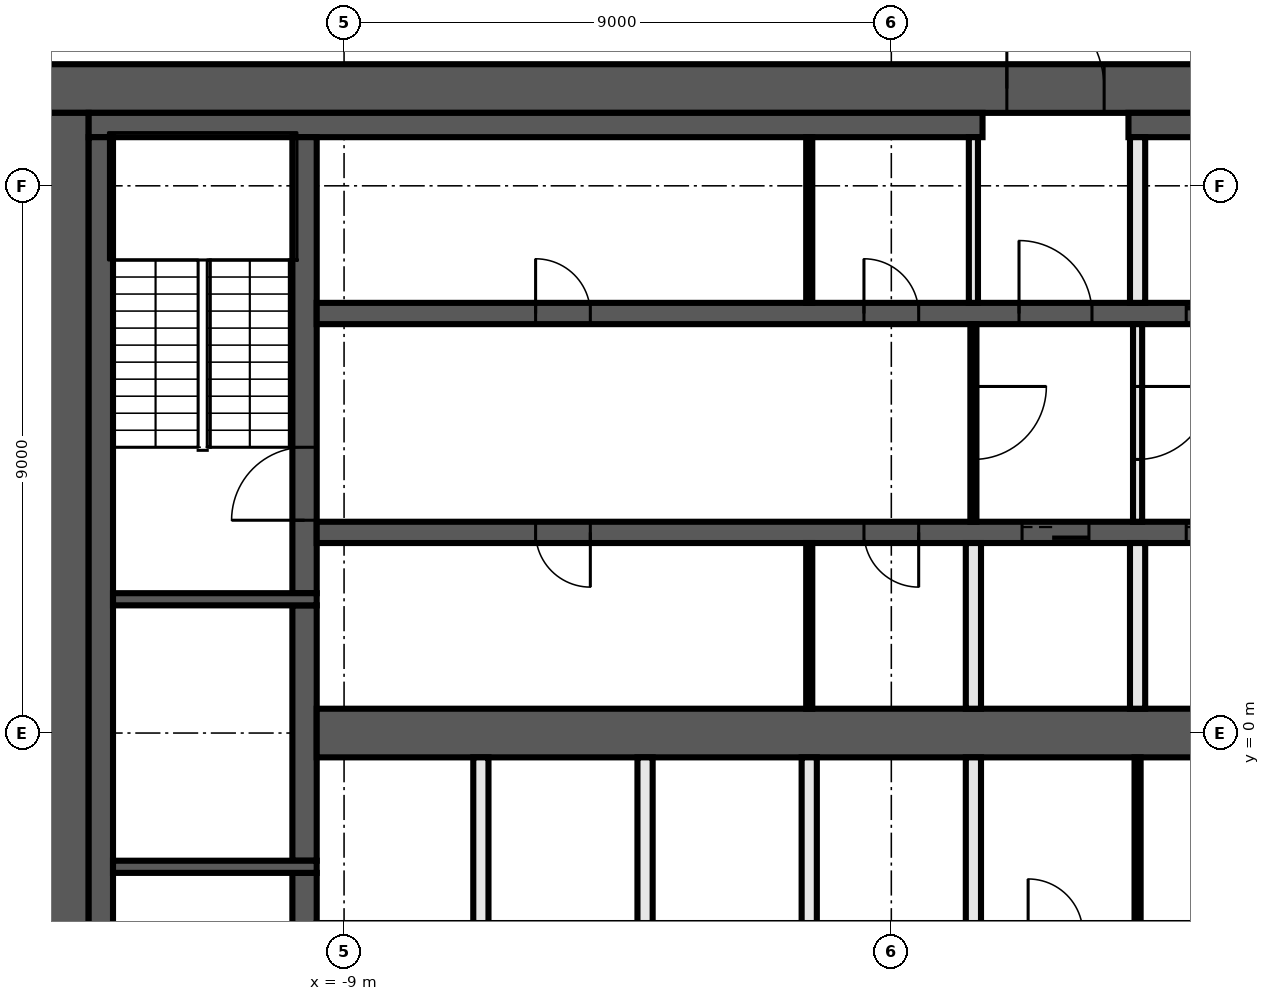
"""IFC4 building model, lengths in metres.
Left out: names, types, materials, properties, quantities, classifications, styles, units other than length and angle.
Written with IfcOpenShell. Run it as: python <this file> out.ifc"""

import sys

from ifc_helpers import new_model, si_unit, direction, frame, frame_2d, origin, place, context, subcontext, project, spatial, rectangle, extrude, element, fill, save


model = new_model("IFC4")
c1 = context("Model", 3, precision=1e-05, world=origin(), true_north=direction((0.0, 1.0)))
c2 = subcontext(c1, "Body", "Model", "MODEL_VIEW")
j1 = project(units=[si_unit("LENGTHUNIT", "METRE"), si_unit("PLANEANGLEUNIT", "RADIAN")], contexts=[c1])
p1 = place(None, origin())
s1 = spatial("IfcSite", under=j1, at=p1, CompositionType="ELEMENT")
p2 = place(p1, origin())
s2 = spatial("IfcBuilding", under=s1, at=p2, CompositionType="ELEMENT")
p3 = place(p2, frame((0.0, 0.0, 175.4)))
s3 = spatial("IfcBuildingStorey", under=s2, at=p3, CompositionType="ELEMENT", Elevation=175.4)
p4 = place(p3, frame((-14.0, 10.6, 0.0), z_axis=(0.0, 0.0, 1.0), x_axis=(1.0, 0.0, 0.0)))
e1 = element("IfcWall", 1, at=p4, inside=s3, PredefinedType="SHEAR", context=c2, shape_type="SweptSolid", body=[
    extrude(rectangle(XDim=28.0, YDim=0.8, at=frame_2d((14.0, 0.0))), origin(), (0.0, 0.0, 1.0), 3.82),
])
p5 = place(p4, frame((15.9, 0.0, 0.0)))
e2 = element("IfcOpeningElement", 2, at=p5, cuts=e1, PredefinedType="OPENING", context=c2, shape_type="SweptSolid", body=[
    extrude(rectangle(XDim=1.6, YDim=2.1, at=frame_2d((0.8, 1.05))), frame((0.0, 0.41, 0.0), z_axis=(0.0, -1.0, 0.0), x_axis=(1.0, 0.0, 0.0)), (0.0, 0.0, 1.0), 0.82),
])
p6 = place(p3, frame((-13.6, -10.2, 0.0), z_axis=(0.0, 0.0, 1.0), x_axis=(0.0, 1.0, 0.0)))
e3 = element("IfcWall", 3, at=p6, inside=s3, PredefinedType="SHEAR", context=c2, shape_type="SweptSolid", body=[
    extrude(rectangle(XDim=20.4, YDim=0.8, at=frame_2d((10.2, 0.0))), origin(), (0.0, 0.0, 1.0), 3.82),
])
p7 = place(p3, frame((-13.2, 10.0, 0.0), z_axis=(0.0, 0.0, 1.0), x_axis=(1.0, 0.0, 0.0)))
e4 = element("IfcWall", 4, at=p7, inside=s3, PredefinedType="SHEAR", context=c2, shape_type="SweptSolid", body=[
    extrude(rectangle(XDim=14.7, YDim=0.4, at=frame_2d((7.35, 0.0))), origin(), (0.0, 0.0, 1.0), 3.82),
])
p8 = place(p3, frame((3.9, 10.0, 0.0), z_axis=(0.0, 0.0, 1.0), x_axis=(1.0, 0.0, 0.0)))
e5 = element("IfcWall", 5, at=p8, inside=s3, PredefinedType="SHEAR", context=c2, shape_type="SweptSolid", body=[
    extrude(rectangle(XDim=9.3, YDim=0.4, at=frame_2d((4.65, 0.0))), origin(), (0.0, 0.0, 1.0), 3.82),
])
p9 = place(p3, frame((-13.0, -9.8, 0.0), z_axis=(0.0, 0.0, 1.0), x_axis=(0.0, 1.0, 0.0)))
e6 = element("IfcWall", 6, at=p9, inside=s3, PredefinedType="SHEAR", context=c2, shape_type="SweptSolid", body=[
    extrude(rectangle(XDim=19.6, YDim=0.4, at=frame_2d((9.8, 0.0))), origin(), (0.0, 0.0, 1.0), 3.82),
])
p10 = place(p3, frame((-9.65, -9.8, 0.0), z_axis=(0.0, 0.0, 1.0), x_axis=(0.0, 1.0, 0.0)))
e7 = element("IfcWall", 7, at=p10, inside=s3, PredefinedType="SHEAR", context=c2, shape_type="SweptSolid", body=[
    extrude(rectangle(XDim=7.5, YDim=0.4, at=frame_2d((3.75, 0.0))), origin(), (0.0, 0.0, 1.0), 3.82),
])
p11 = place(p10, frame((5.1, 0.0, 0.0)))
e8 = element("IfcOpeningElement", 8, at=p11, cuts=e7, PredefinedType="OPENING", context=c2, shape_type="SweptSolid", body=[
    extrude(rectangle(XDim=1.2, YDim=2.1, at=frame_2d((0.6, 1.05))), frame((0.0, 0.21, 0.0), z_axis=(0.0, -1.0, 0.0), x_axis=(1.0, 0.0, 0.0)), (0.0, 0.0, 1.0), 0.42),
])
p12 = place(p3, frame((-9.65, -2.1, 0.0), z_axis=(0.0, 0.0, 1.0), x_axis=(0.0, 1.0, 0.0)))
e9 = element("IfcWall", 9, at=p12, inside=s3, PredefinedType="SHEAR", context=c2, shape_type="SweptSolid", body=[
    extrude(rectangle(XDim=4.2, YDim=0.4, at=frame_2d((2.1, 0.0))), origin(), (0.0, 0.0, 1.0), 3.82),
])
p13 = place(p3, frame((-9.65, 2.3, 0.0), z_axis=(0.0, 0.0, 1.0), x_axis=(0.0, 1.0, 0.0)))
e10 = element("IfcWall", 10, at=p13, inside=s3, PredefinedType="SHEAR", context=c2, shape_type="SweptSolid", body=[
    extrude(rectangle(XDim=7.5, YDim=0.4, at=frame_2d((3.75, 0.0))), origin(), (0.0, 0.0, 1.0), 3.82),
])
p14 = place(p13, frame((1.2, 0.0, 0.0)))
e11 = element("IfcOpeningElement", 11, at=p14, cuts=e10, PredefinedType="OPENING", context=c2, shape_type="SweptSolid", body=[
    extrude(rectangle(XDim=1.2, YDim=2.1, at=frame_2d((0.6, 1.05))), frame((0.0, 0.21, 0.0), z_axis=(0.0, -1.0, 0.0), x_axis=(1.0, 0.0, 0.0)), (0.0, 0.0, 1.0), 0.42),
])
for number, where, z_axis, x_axis in (
    (12, (-9.45, 2.2, 0.0), (0.0, 0.0, 1.0), (-1.0, 0.0, 0.0)),
    (13, (-9.45, -2.2, 0.0), (0.0, 0.0, 1.0), (-1.0, 0.0, 0.0)),
):
    element("IfcWall", number, at=place(p3, frame(where, z_axis=z_axis, x_axis=x_axis)), inside=s3, PredefinedType="SHEAR", context=c2, shape_type="SweptSolid", body=[
        extrude(rectangle(XDim=3.35, YDim=0.2, at=frame_2d((1.675, 0.0))), origin(), (0.0, 0.0, 1.0), 3.82),
    ])
p15 = place(p3, frame((-9.45, 6.9, 0.0), z_axis=(0.0, 0.0, 1.0), x_axis=(1.0, 0.0, 0.0)))
e14 = element("IfcWall", 14, at=p15, inside=s3, PredefinedType="SHEAR", context=c2, shape_type="SweptSolid", body=[
    extrude(rectangle(XDim=18.9, YDim=0.35, at=frame_2d((9.45, 0.0))), origin(), (0.0, 0.0, 1.0), 3.82),
])
p16 = place(p15, frame((11.55, 0.0, 0.0)))
e15 = element("IfcOpeningElement", 15, at=p16, cuts=e14, PredefinedType="OPENING", context=c2, shape_type="SweptSolid", body=[
    extrude(rectangle(XDim=1.2, YDim=2.1, at=frame_2d((0.6, 1.05))), frame((0.0, 0.185, 0.0), z_axis=(0.0, -1.0, 0.0), x_axis=(1.0, 0.0, 0.0)), (0.0, 0.0, 1.0), 0.37),
])
p17 = place(p15, frame((14.3, 0.0, 0.0)))
e16 = element("IfcOpeningElement", 16, at=p17, cuts=e14, PredefinedType="OPENING", context=c2, shape_type="SweptSolid", body=[
    extrude(rectangle(XDim=1.1, YDim=2.1, at=frame_2d((0.55, 1.05))), frame((0.0, 0.185, 0.0), z_axis=(0.0, -1.0, 0.0), x_axis=(1.0, 0.0, 0.0)), (0.0, 0.0, 1.0), 0.37),
])
p18 = place(p15, frame((17.0, 0.0, 0.0)))
e17 = element("IfcOpeningElement", 17, at=p18, cuts=e14, PredefinedType="OPENING", context=c2, shape_type="SweptSolid", body=[
    extrude(rectangle(XDim=1.1, YDim=2.1, at=frame_2d((0.55, 1.05))), frame((0.0, 0.185, 0.0), z_axis=(0.0, -1.0, 0.0), x_axis=(1.0, 0.0, 0.0)), (0.0, 0.0, 1.0), 0.37),
])
p19 = place(p15, frame((3.6, 0.0, 0.0)))
e18 = element("IfcOpeningElement", 18, at=p19, cuts=e14, PredefinedType="OPENING", context=c2, shape_type="SweptSolid", body=[
    extrude(rectangle(XDim=0.9, YDim=2.1, at=frame_2d((0.45, 1.05))), frame((0.0, 0.185, 0.0), z_axis=(0.0, -1.0, 0.0), x_axis=(1.0, 0.0, 0.0)), (0.0, 0.0, 1.0), 0.37),
])
p20 = place(p15, frame((9.0, 0.0, 0.0)))
e19 = element("IfcOpeningElement", 19, at=p20, cuts=e14, PredefinedType="OPENING", context=c2, shape_type="SweptSolid", body=[
    extrude(rectangle(XDim=0.9, YDim=2.1, at=frame_2d((0.45, 1.05))), frame((0.0, 0.185, 0.0), z_axis=(0.0, -1.0, 0.0), x_axis=(1.0, 0.0, 0.0)), (0.0, 0.0, 1.0), 0.37),
])
p21 = place(p3, frame((9.45, 3.3, 0.0), z_axis=(0.0, 0.0, 1.0), x_axis=(-1.0, 0.0, 0.0)))
e20 = element("IfcWall", 20, at=p21, inside=s3, PredefinedType="SHEAR", context=c2, shape_type="SweptSolid", body=[
    extrude(rectangle(XDim=18.9, YDim=0.35, at=frame_2d((9.45, 0.0))), origin(), (0.0, 0.0, 1.0), 3.82),
])
p22 = place(p21, frame((6.2, 0.0, 0.0)))
e21 = element("IfcOpeningElement", 21, at=p22, cuts=e20, PredefinedType="OPENING", context=c2, shape_type="SweptSolid", body=[
    extrude(rectangle(XDim=1.1, YDim=2.1, at=frame_2d((0.55, 1.05))), frame((0.0, 0.185, 0.0), z_axis=(0.0, -1.0, 0.0), x_axis=(1.0, 0.0, 0.0)), (0.0, 0.0, 1.0), 0.37),
])
p23 = place(p21, frame((3.5, 0.0, 0.0)))
e22 = element("IfcOpeningElement", 22, at=p23, cuts=e20, PredefinedType="OPENING", context=c2, shape_type="SweptSolid", body=[
    extrude(rectangle(XDim=1.1, YDim=2.1, at=frame_2d((0.55, 1.05))), frame((0.0, 0.185, 0.0), z_axis=(0.0, -1.0, 0.0), x_axis=(1.0, 0.0, 0.0)), (0.0, 0.0, 1.0), 0.37),
])
p24 = place(p21, frame((0.9, 0.0, 0.0)))
e23 = element("IfcOpeningElement", 23, at=p24, cuts=e20, PredefinedType="OPENING", context=c2, shape_type="SweptSolid", body=[
    extrude(rectangle(XDim=0.9, YDim=2.1, at=frame_2d((0.45, 1.05))), frame((0.0, 0.185, 0.0), z_axis=(0.0, -1.0, 0.0), x_axis=(1.0, 0.0, 0.0)), (0.0, 0.0, 1.0), 0.37),
])
p25 = place(p21, frame((14.4, 0.0, 0.0)))
e24 = element("IfcOpeningElement", 24, at=p25, cuts=e20, PredefinedType="OPENING", context=c2, shape_type="SweptSolid", body=[
    extrude(rectangle(XDim=0.9, YDim=2.1, at=frame_2d((0.45, 1.05))), frame((0.0, 0.185, 0.0), z_axis=(0.0, -1.0, 0.0), x_axis=(1.0, 0.0, 0.0)), (0.0, 0.0, 1.0), 0.37),
])
p26 = place(p21, frame((9.0, 0.0, 0.0)))
e25 = element("IfcOpeningElement", 25, at=p26, cuts=e20, PredefinedType="OPENING", context=c2, shape_type="SweptSolid", body=[
    extrude(rectangle(XDim=0.9, YDim=2.1, at=frame_2d((0.45, 1.05))), frame((0.0, 0.185, 0.0), z_axis=(0.0, -1.0, 0.0), x_axis=(1.0, 0.0, 0.0)), (0.0, 0.0, 1.0), 0.37),
])
p27 = place(p3, frame((-9.45, 0.0, 0.0), z_axis=(0.0, 0.0, 1.0), x_axis=(1.0, 0.0, 0.0)))
e26 = element("IfcWall", 26, at=p27, inside=s3, PredefinedType="SHEAR", context=c2, shape_type="SweptSolid", body=[
    extrude(rectangle(XDim=18.9, YDim=0.8, at=frame_2d((9.45, 0.0))), origin(), (0.0, 0.0, 1.0), 3.82),
])
p28 = place(p3, frame((4.05, 6.725, 0.0), z_axis=(0.0, 0.0, 1.0), x_axis=(0.0, -1.0, 0.0)))
e27 = element("IfcWall", 27, at=p28, inside=s3, PredefinedType="PARTITIONING", context=c2, shape_type="SweptSolid", body=[
    extrude(rectangle(XDim=3.25, YDim=0.15, at=frame_2d((1.625, 0.0))), origin(), (0.0, 0.0, 1.0), 3.82),
])
p29 = place(p28, frame((1.025, 0.0, 0.0)))
e28 = element("IfcOpeningElement", 28, at=p29, cuts=e27, PredefinedType="OPENING", context=c2, shape_type="SweptSolid", body=[
    extrude(rectangle(XDim=1.2, YDim=2.1, at=frame_2d((0.6, 1.05))), frame((0.0, 0.085, 0.0), z_axis=(0.0, -1.0, 0.0), x_axis=(1.0, 0.0, 0.0)), (0.0, 0.0, 1.0), 0.17),
])
p30 = place(p3, frame((4.05, -3.125, 0.0), z_axis=(0.0, 0.0, 1.0), x_axis=(0.0, 1.0, 0.0)))
e29 = element("IfcWall", 29, at=p30, inside=s3, PredefinedType="PARTITIONING", context=c2, shape_type="SweptSolid", body=[
    extrude(rectangle(XDim=2.725, YDim=0.1, at=frame_2d((1.363, 0.0))), origin(), (0.0, 0.0, 1.0), 3.82),
])
for number, where, z_axis, x_axis in (
    (30, (4.05, 0.4, 0.0), (0.0, 0.0, 1.0), (0.0, 1.0, 0.0)),
    (31, (4.05, 7.075, 0.0), (0.0, 0.0, 1.0), (0.0, 1.0, 0.0)),
):
    element("IfcWall", number, at=place(p3, frame(where, z_axis=z_axis, x_axis=x_axis)), inside=s3, PredefinedType="SOLIDWALL", context=c2, shape_type="SweptSolid", body=[
        extrude(rectangle(XDim=2.725, YDim=0.25, at=frame_2d((1.363, 0.0))), origin(), (0.0, 0.0, 1.0), 3.82),
    ])
p31 = place(p3, frame((1.35, 7.075, 0.0), z_axis=(0.0, 0.0, 1.0), x_axis=(0.0, 1.0, 0.0)))
e32 = element("IfcWall", 32, at=p31, inside=s3, PredefinedType="PARTITIONING", context=c2, shape_type="SweptSolid", body=[
    extrude(rectangle(XDim=2.725, YDim=0.15, at=frame_2d((1.363, 0.0))), origin(), (0.0, 0.0, 1.0), 3.82),
])
p32 = place(p3, frame((1.35, 6.725, 0.0), z_axis=(0.0, 0.0, 1.0), x_axis=(0.0, -1.0, 0.0)))
e33 = element("IfcWall", 33, at=p32, inside=s3, PredefinedType="PARTITIONING", context=c2, shape_type="SweptSolid", body=[
    extrude(rectangle(XDim=3.25, YDim=0.1, at=frame_2d((1.625, 0.0))), origin(), (0.0, 0.0, 1.0), 3.82),
])
p33 = place(p32, frame((1.025, 0.0, 0.0)))
e34 = element("IfcOpeningElement", 34, at=p33, cuts=e33, PredefinedType="OPENING", context=c2, shape_type="SweptSolid", body=[
    extrude(rectangle(XDim=1.2, YDim=2.1, at=frame_2d((0.6, 1.05))), frame((0.0, 0.06, 0.0), z_axis=(0.0, -1.0, 0.0), x_axis=(1.0, 0.0, 0.0)), (0.0, 0.0, 1.0), 0.12),
])
for number, where, z_axis, x_axis in (
    (35, (1.35, -3.125, 0.0), (0.0, 0.0, 1.0), (0.0, 1.0, 0.0)),
    (36, (1.35, 0.4, 0.0), (0.0, 0.0, 1.0), (0.0, 1.0, 0.0)),
):
    element("IfcWall", number, at=place(p3, frame(where, z_axis=z_axis, x_axis=x_axis)), inside=s3, PredefinedType="SOLIDWALL", context=c2, shape_type="SweptSolid", body=[
        extrude(rectangle(XDim=2.725, YDim=0.25, at=frame_2d((1.363, 0.0))), origin(), (0.0, 0.0, 1.0), 3.82),
    ])
for number, where, z_axis, x_axis in (
    (37, (-1.35, 0.4, 0.0), (0.0, 0.0, 1.0), (0.0, 1.0, 0.0)),
    (38, (-1.35, 7.075, 0.0), (0.0, 0.0, 1.0), (0.0, 1.0, 0.0)),
):
    element("IfcWall", number, at=place(p3, frame(where, z_axis=z_axis, x_axis=x_axis)), inside=s3, PredefinedType="PARTITIONING", context=c2, shape_type="SweptSolid", body=[
        extrude(rectangle(XDim=2.725, YDim=0.1, at=frame_2d((1.363, 0.0))), origin(), (0.0, 0.0, 1.0), 3.82),
    ])
for number, where, z_axis, x_axis in (
    (39, (-1.35, -3.125, 0.0), (0.0, 0.0, 1.0), (0.0, 1.0, 0.0)),
    (40, (-4.05, -3.125, 0.0), (0.0, 0.0, 1.0), (0.0, 1.0, 0.0)),
    (41, (-6.75, -3.125, 0.0), (0.0, 0.0, 1.0), (0.0, 1.0, 0.0)),
):
    element("IfcWall", number, at=place(p3, frame(where, z_axis=z_axis, x_axis=x_axis)), inside=s3, PredefinedType="SOLIDWALL", context=c2, shape_type="SweptSolid", body=[
        extrude(rectangle(XDim=2.725, YDim=0.25, at=frame_2d((1.363, 0.0))), origin(), (0.0, 0.0, 1.0), 3.82),
    ])
p34 = place(p5, origin())
e42 = element("IfcDoor", 42, at=p34, inside=s3, OperationType="DOUBLE_DOOR_SINGLE_SWING", PredefinedType="DOOR", context=c2, shape_type="SweptSolid", body=[
    extrude(rectangle(XDim=1.6, YDim=2.1, at=frame_2d((0.8, 1.05))), frame((0.0, 0.025, 0.0), z_axis=(0.0, -1.0, 0.0), x_axis=(1.0, 0.0, 0.0)), (0.0, 0.0, 1.0), 0.05),
])
fill(e2, e42)
p35 = place(p16, origin())
e43 = element("IfcDoor", 43, at=p35, inside=s3, OperationType="SINGLE_SWING_LEFT", PredefinedType="DOOR", context=c2, shape_type="SweptSolid", body=[
    extrude(rectangle(XDim=1.2, YDim=2.1, at=frame_2d((0.6, 1.05))), frame((0.0, 0.025, 0.0), z_axis=(0.0, -1.0, 0.0), x_axis=(1.0, 0.0, 0.0)), (0.0, 0.0, 1.0), 0.05),
])
fill(e15, e43)
p36 = place(p17, origin())
e44 = element("IfcDoor", 44, at=p36, inside=s3, OperationType="DOUBLE_DOOR_SLIDING", PredefinedType="DOOR", context=c2, shape_type="SweptSolid", body=[
    extrude(rectangle(XDim=1.1, YDim=2.1, at=frame_2d((0.55, 1.05))), frame((0.0, 0.025, 0.0), z_axis=(0.0, -1.0, 0.0), x_axis=(1.0, 0.0, 0.0)), (0.0, 0.0, 1.0), 0.05),
])
fill(e16, e44)
p37 = place(p22, origin())
e45 = element("IfcDoor", 45, at=p37, inside=s3, OperationType="DOUBLE_DOOR_SLIDING", PredefinedType="DOOR", context=c2, shape_type="SweptSolid", body=[
    extrude(rectangle(XDim=1.1, YDim=2.1, at=frame_2d((0.55, 1.05))), frame((0.0, 0.025, 0.0), z_axis=(0.0, -1.0, 0.0), x_axis=(1.0, 0.0, 0.0)), (0.0, 0.0, 1.0), 0.05),
])
fill(e21, e45)
p38 = place(p23, origin())
e46 = element("IfcDoor", 46, at=p38, inside=s3, OperationType="DOUBLE_DOOR_SLIDING", PredefinedType="DOOR", context=c2, shape_type="SweptSolid", body=[
    extrude(rectangle(XDim=1.1, YDim=2.1, at=frame_2d((0.55, 1.05))), frame((0.0, 0.025, 0.0), z_axis=(0.0, -1.0, 0.0), x_axis=(1.0, 0.0, 0.0)), (0.0, 0.0, 1.0), 0.05),
])
fill(e22, e46)
p39 = place(p19, origin())
e47 = element("IfcDoor", 47, at=p39, inside=s3, OperationType="SINGLE_SWING_RIGHT", PredefinedType="DOOR", context=c2, shape_type="SweptSolid", body=[
    extrude(rectangle(XDim=0.9, YDim=2.1, at=frame_2d((0.45, 1.05))), frame((0.0, 0.025, 0.0), z_axis=(0.0, -1.0, 0.0), x_axis=(1.0, 0.0, 0.0)), (0.0, 0.0, 1.0), 0.05),
])
fill(e18, e47)
p40 = place(p20, origin())
e48 = element("IfcDoor", 48, at=p40, inside=s3, OperationType="SINGLE_SWING_LEFT", PredefinedType="DOOR", context=c2, shape_type="SweptSolid", body=[
    extrude(rectangle(XDim=0.9, YDim=2.1, at=frame_2d((0.45, 1.05))), frame((0.0, 0.025, 0.0), z_axis=(0.0, -1.0, 0.0), x_axis=(1.0, 0.0, 0.0)), (0.0, 0.0, 1.0), 0.05),
])
fill(e19, e48)
p41 = place(p25, origin())
e49 = element("IfcDoor", 49, at=p41, inside=s3, OperationType="SINGLE_SWING_RIGHT", PredefinedType="DOOR", context=c2, shape_type="SweptSolid", body=[
    extrude(rectangle(XDim=0.9, YDim=2.1, at=frame_2d((0.45, 1.05))), frame((0.0, 0.025, 0.0), z_axis=(0.0, -1.0, 0.0), x_axis=(1.0, 0.0, 0.0)), (0.0, 0.0, 1.0), 0.05),
])
fill(e24, e49)
p42 = place(p26, origin())
e50 = element("IfcDoor", 50, at=p42, inside=s3, OperationType="SINGLE_SWING_LEFT", PredefinedType="DOOR", context=c2, shape_type="SweptSolid", body=[
    extrude(rectangle(XDim=0.9, YDim=2.1, at=frame_2d((0.45, 1.05))), frame((0.0, 0.025, 0.0), z_axis=(0.0, -1.0, 0.0), x_axis=(1.0, 0.0, 0.0)), (0.0, 0.0, 1.0), 0.05),
])
fill(e25, e50)
p43 = place(p14, origin())
e51 = element("IfcDoor", 51, at=p43, inside=s3, OperationType="SINGLE_SWING_RIGHT", PredefinedType="DOOR", context=c2, shape_type="SweptSolid", body=[
    extrude(rectangle(XDim=1.2, YDim=2.1, at=frame_2d((0.6, 1.05))), frame((0.0, 0.025, 0.0), z_axis=(0.0, -1.0, 0.0), x_axis=(1.0, 0.0, 0.0)), (0.0, 0.0, 1.0), 0.05),
])
fill(e11, e51)
p44 = place(p33, origin())
e52 = element("IfcDoor", 52, at=p44, inside=s3, OperationType="SINGLE_SWING_LEFT", PredefinedType="DOOR", context=c2, shape_type="SweptSolid", body=[
    extrude(rectangle(XDim=1.2, YDim=2.1, at=frame_2d((0.6, 1.05))), frame((0.0, 0.025, 0.0), z_axis=(0.0, -1.0, 0.0), x_axis=(1.0, 0.0, 0.0)), (0.0, 0.0, 1.0), 0.05),
])
fill(e34, e52)
p45 = place(p29, origin())
e53 = element("IfcDoor", 53, at=p45, inside=s3, OperationType="SINGLE_SWING_RIGHT", PredefinedType="DOOR", context=c2, shape_type="SweptSolid", body=[
    extrude(rectangle(XDim=1.2, YDim=2.1, at=frame_2d((0.6, 1.05))), frame((0.0, 0.025, 0.0), z_axis=(0.0, -1.0, 0.0), x_axis=(1.0, 0.0, 0.0)), (0.0, 0.0, 1.0), 0.05),
])
fill(e28, e53)
save(model, sys.argv[1])
